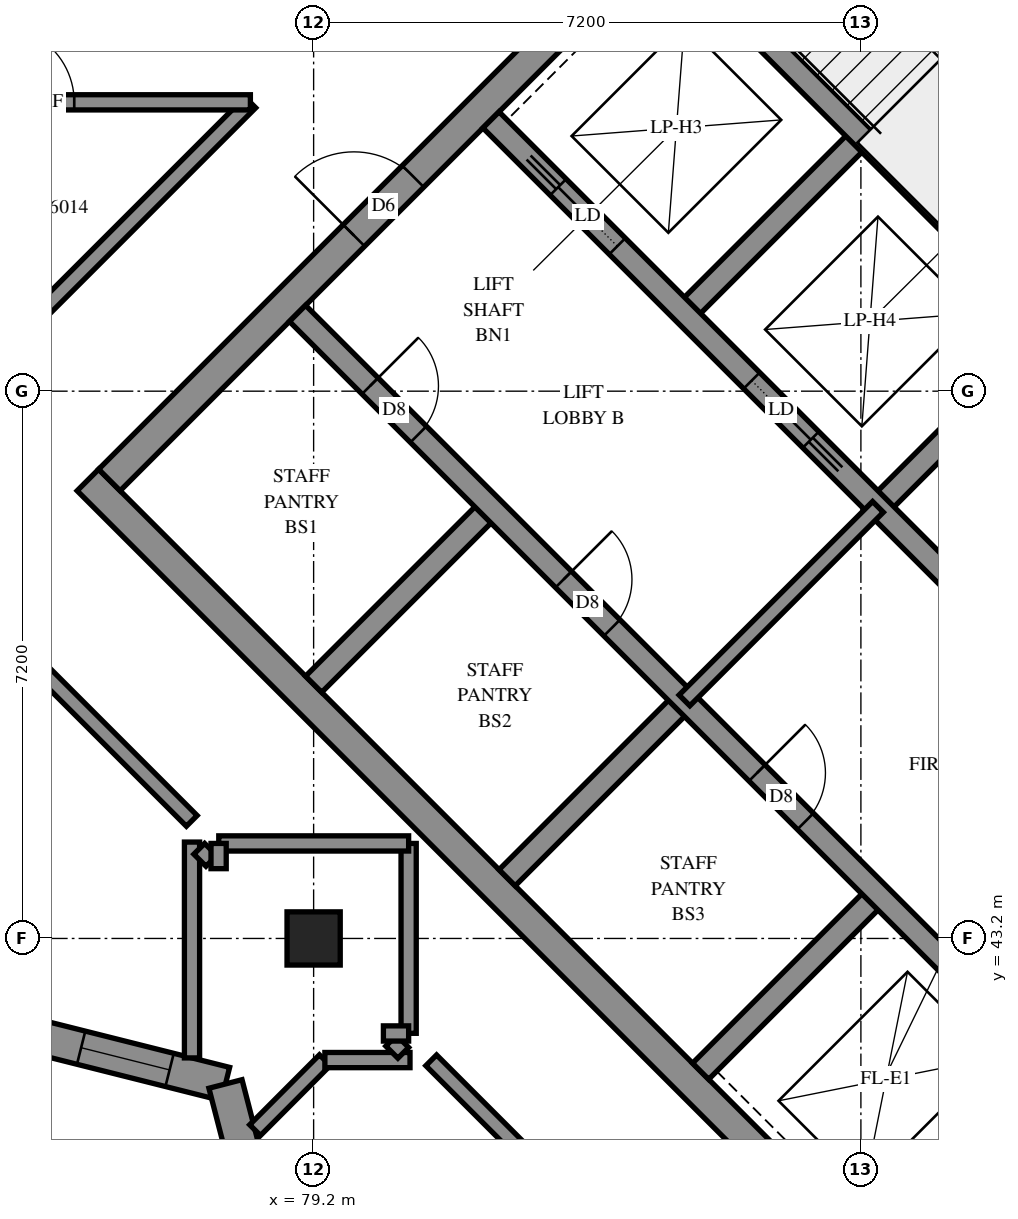
"""IFC4 building model, lengths in metres.
Left out: names, types, materials, properties, quantities, classifications, styles, units other than length and angle.
Written with IfcOpenShell. Run it as: python <this file> out.ifc"""

import sys

from ifc_helpers import new_model, si_unit, direction, frame, frame_2d, origin, origin_2d, place, context, subcontext, project, spatial, polyline, rectangle, outline, extrude, element, fill, save


model = new_model("IFC4")
c1 = context("Model", 3, precision=1e-05, world=origin(), true_north=direction((0.0, 1.0)))
c2 = subcontext(c1, "Body", "Model", "MODEL_VIEW")
j1 = project(units=[si_unit("LENGTHUNIT", "METRE"), si_unit("PLANEANGLEUNIT", "RADIAN")], contexts=[c1])
p1 = place(None, origin())
s1 = spatial("IfcSite", under=j1, at=p1, CompositionType="ELEMENT")
p2 = place(p1, origin())
s2 = spatial("IfcBuilding", under=s1, at=p2, CompositionType="ELEMENT")
p3 = place(p2, frame((0.0, 0.0, 243.8)))
s3 = spatial("IfcBuildingStorey", under=s2, at=p3, CompositionType="ELEMENT", Elevation=243.8)
p4 = place(p3, frame((79.2, 43.2, 0.0), z_axis=(0.0, 0.0, 1.0), x_axis=(1.0, 0.0, 0.0)))
e1 = element("IfcColumn", 1, at=p4, inside=s3, PredefinedType="COLUMN", context=c2, shape_type="SweptSolid", body=[
    extrude(rectangle(XDim=0.7, YDim=0.7, at=origin_2d()), origin(), (0.0, 0.0, 1.0), 3.1),
])
p5 = place(p3, frame((76.23, 49.231, -0.3), z_axis=(0.0, 0.0, 1.0), x_axis=(0.7071034917, -0.7071100706, 0.0)))
e2 = element("IfcWall", 2, at=p5, inside=s3, PredefinedType="SHEAR", context=c2, shape_type="SweptSolid", body=[
    extrude(rectangle(XDim=15.2, YDim=0.4, at=frame_2d((7.6, 0.0))), origin(), (0.0, 0.0, 1.0), 2.7),
])
p6 = place(p3, frame((86.695, 59.696, -0.3), z_axis=(0.0, 0.0, 1.0), x_axis=(0.7071100706, -0.7071034917, 0.0)))
e3 = element("IfcWall", 3, at=p6, inside=s3, PredefinedType="SHEAR", context=c2, shape_type="SweptSolid", body=[
    extrude(rectangle(XDim=15.2, YDim=0.4, at=frame_2d((7.6, 0.0))), origin(), (0.0, 0.0, 1.0), 2.7),
])
p7 = place(p6, frame((10.4, 0.0, 0.3)))
e4 = element("IfcOpeningElement", 4, at=p7, cuts=e3, PredefinedType="OPENING", context=c2, shape_type="SweptSolid", body=[
    extrude(rectangle(XDim=0.8, YDim=2.1, at=frame_2d((0.4, 1.05))), frame((0.0, 0.21, 0.0), z_axis=(0.0, -1.0, 0.0), x_axis=(1.0, 0.0, 0.0)), (0.0, 0.0, 1.0), 0.42),
])
p8 = place(p3, frame((76.513, 49.231, -0.3), z_axis=(0.0, 0.0, 1.0), x_axis=(0.7071067812, 0.7071067812, 0.0)))
e5 = element("IfcWall", 5, at=p8, inside=s3, PredefinedType="SHEAR", context=c2, shape_type="SweptSolid", body=[
    extrude(rectangle(XDim=14.4, YDim=0.4, at=frame_2d((7.2, 0.0))), origin(), (0.0, 0.0, 1.0), 2.7),
])
p9 = place(p8, frame((4.55, 0.0, 0.3)))
e6 = element("IfcOpeningElement", 6, at=p9, cuts=e5, PredefinedType="OPENING", context=c2, shape_type="SweptSolid", body=[
    extrude(rectangle(XDim=1.1, YDim=2.1, at=frame_2d((0.55, 1.05))), frame((0.0, 0.21, 0.0), z_axis=(0.0, -1.0, 0.0), x_axis=(1.0, 0.0, 0.0)), (0.0, 0.0, 1.0), 0.42),
])
p10 = place(p8, frame((11.35, 0.0, 0.3)))
e7 = element("IfcOpeningElement", 7, at=p10, cuts=e5, PredefinedType="OPENING", context=c2, shape_type="SweptSolid", body=[
    extrude(rectangle(XDim=1.1, YDim=2.1, at=frame_2d((0.55, 1.05))), frame((0.0, 0.21, 0.0), z_axis=(0.0, -1.0, 0.0), x_axis=(1.0, 0.0, 0.0)), (0.0, 0.0, 1.0), 0.42),
])
p11 = place(p3, frame((86.978, 38.766, -0.3), z_axis=(0.0, 0.0, 1.0), x_axis=(0.7071067812, 0.7071067812, 0.0)))
e8 = element("IfcWall", 8, at=p11, inside=s3, PredefinedType="SHEAR", context=c2, shape_type="SweptSolid", body=[
    extrude(rectangle(XDim=14.4, YDim=0.4, at=frame_2d((7.2, 0.0))), origin(), (0.0, 0.0, 1.0), 2.7),
])
p12 = place(p11, frame((4.55, 0.0, 0.3)))
e9 = element("IfcOpeningElement", 9, at=p12, cuts=e8, PredefinedType="OPENING", context=c2, shape_type="SweptSolid", body=[
    extrude(rectangle(XDim=1.1, YDim=2.1, at=frame_2d((0.55, 1.05))), frame((0.0, 0.21, 0.0), z_axis=(0.0, -1.0, 0.0), x_axis=(1.0, 0.0, 0.0)), (0.0, 0.0, 1.0), 0.42),
])
p13 = place(p11, frame((11.35, 0.0, 0.3)))
e10 = element("IfcOpeningElement", 10, at=p13, cuts=e8, PredefinedType="OPENING", context=c2, shape_type="SweptSolid", body=[
    extrude(rectangle(XDim=1.1, YDim=2.1, at=frame_2d((0.55, 1.05))), frame((0.0, 0.21, 0.0), z_axis=(0.0, -1.0, 0.0), x_axis=(1.0, 0.0, 0.0)), (0.0, 0.0, 1.0), 0.42),
])
for number, where, z_axis, x_axis in (
    (11, (79.2, 46.544, 0.0), (0.0, 0.0, 1.0), (0.707, 0.707, 0.0)),
    (12, (84.079, 51.423, 0.0), (0.0, 0.0, 1.0), (0.707, 0.707, 0.0)),
):
    element("IfcWall", number, at=place(p3, frame(where, z_axis=z_axis, x_axis=x_axis)), inside=s3, PredefinedType="SOLIDWALL", context=c2, shape_type="SweptSolid", body=[
        extrude(rectangle(XDim=3.3, YDim=0.3, at=frame_2d((1.65, 0.0))), origin(), (0.0, 0.0, 1.0), 3.1),
    ])
p14 = place(p3, frame((81.746, 43.999, 0.0), z_axis=(0.0, 0.0, 1.0), x_axis=(0.7071067812, 0.7071067812, 0.0)))
e13 = element("IfcWall", 13, at=p14, inside=s3, PredefinedType="SOLIDWALL", context=c2, shape_type="SweptSolid", body=[
    extrude(rectangle(XDim=3.3, YDim=0.3, at=frame_2d((1.65, 0.0))), origin(), (0.0, 0.0, 1.0), 3.1),
])
p15 = place(p3, frame((86.625, 48.878, 0.0), z_axis=(0.0, 0.0, 1.0), x_axis=(0.7071067812, 0.7071067812, 0.0)))
e14 = element("IfcWall", 14, at=p15, inside=s3, PredefinedType="SOLIDWALL", context=c2, shape_type="SweptSolid", body=[
    extrude(rectangle(XDim=3.3, YDim=0.3, at=frame_2d((1.65, 0.0))), origin(), (0.0, 0.0, 1.0), 3.1),
])
p16 = place(p3, frame((84.291, 41.453, 0.0), z_axis=(0.0, 0.0, 1.0), x_axis=(0.7071067812, 0.7071067812, 0.0)))
e15 = element("IfcWall", 15, at=p16, inside=s3, PredefinedType="SOLIDWALL", context=c2, shape_type="SweptSolid", body=[
    extrude(rectangle(XDim=3.3, YDim=0.3, at=frame_2d((1.65, 0.0))), origin(), (0.0, 0.0, 1.0), 3.1),
])
p17 = place(p3, frame((78.988, 51.423, 0.0), z_axis=(0.0, 0.0, 1.0), x_axis=(0.7071067812, -0.7071067812, 0.0)))
e16 = element("IfcWall", 16, at=p17, inside=s3, PredefinedType="SOLIDWALL", context=c2, shape_type="SweptSolid", body=[
    extrude(rectangle(XDim=14.4, YDim=0.3, at=frame_2d((7.2, 0.0))), origin(), (0.0, 0.0, 1.0), 3.1),
])
p18 = place(p17, frame((1.35, 0.0, 0.0)))
e17 = element("IfcOpeningElement", 17, at=p18, cuts=e16, PredefinedType="OPENING", context=c2, shape_type="SweptSolid", body=[
    extrude(rectangle(XDim=0.9, YDim=2.1, at=frame_2d((0.45, 1.05))), frame((0.0, 0.16, 0.0), z_axis=(0.0, -1.0, 0.0), x_axis=(1.0, 0.0, 0.0)), (0.0, 0.0, 1.0), 0.32),
])
p19 = place(p17, frame((4.95, 0.0, 0.0)))
e18 = element("IfcOpeningElement", 18, at=p19, cuts=e16, PredefinedType="OPENING", context=c2, shape_type="SweptSolid", body=[
    extrude(rectangle(XDim=0.9, YDim=2.1, at=frame_2d((0.45, 1.05))), frame((0.0, 0.16, 0.0), z_axis=(0.0, -1.0, 0.0), x_axis=(1.0, 0.0, 0.0)), (0.0, 0.0, 1.0), 0.32),
])
p20 = place(p17, frame((8.55, 0.0, 0.0)))
e19 = element("IfcOpeningElement", 19, at=p20, cuts=e16, PredefinedType="OPENING", context=c2, shape_type="SweptSolid", body=[
    extrude(rectangle(XDim=0.9, YDim=2.1, at=frame_2d((0.45, 1.05))), frame((0.0, 0.16, 0.0), z_axis=(0.0, -1.0, 0.0), x_axis=(1.0, 0.0, 0.0)), (0.0, 0.0, 1.0), 0.32),
])
p21 = place(p17, frame((12.05, 0.0, 0.0)))
e20 = element("IfcOpeningElement", 20, at=p21, cuts=e16, PredefinedType="OPENING", context=c2, shape_type="SweptSolid", body=[
    extrude(rectangle(XDim=1.1, YDim=2.1, at=frame_2d((0.55, 1.05))), frame((0.0, 0.16, 0.0), z_axis=(0.0, -1.0, 0.0), x_axis=(1.0, 0.0, 0.0)), (0.0, 0.0, 1.0), 0.32),
])
p22 = place(p3, frame((81.534, 53.969, 0.0), z_axis=(0.0, 0.0, 1.0), x_axis=(0.707103309, -0.7071102534, 0.0)))
e21 = element("IfcWall", 21, at=p22, inside=s3, PredefinedType="SOLIDWALL", context=c2, shape_type="SweptSolid", body=[
    extrude(rectangle(XDim=14.4, YDim=0.3, at=frame_2d((7.2, 0.0))), origin(), (0.0, 0.0, 1.0), 3.1),
])
p23 = place(p22, frame((8.55, 0.0, 0.0)))
e22 = element("IfcOpeningElement", 22, at=p23, cuts=e21, PredefinedType="OPENING", context=c2, shape_type="SweptSolid", body=[
    extrude(rectangle(XDim=0.9, YDim=2.1, at=frame_2d((0.45, 1.05))), frame((0.0, 0.16, 0.0), z_axis=(0.0, -1.0, 0.0), x_axis=(1.0, 0.0, 0.0)), (0.0, 0.0, 1.0), 0.32),
])
p24 = place(p22, frame((1.25, 0.0, 0.0)))
e23 = element("IfcOpeningElement", 23, at=p24, cuts=e21, PredefinedType="OPENING", context=c2, shape_type="SweptSolid", body=[
    extrude(rectangle(XDim=1.1, YDim=2.1, at=frame_2d((0.55, 1.05))), frame((0.0, 0.16, 0.0), z_axis=(0.0, -1.0, 0.0), x_axis=(1.0, 0.0, 0.0)), (0.0, 0.0, 1.0), 0.32),
])
p25 = place(p22, frame((4.85, 0.0, 0.0)))
e24 = element("IfcOpeningElement", 24, at=p25, cuts=e21, PredefinedType="OPENING", context=c2, shape_type="SweptSolid", body=[
    extrude(rectangle(XDim=1.1, YDim=2.1, at=frame_2d((0.55, 1.05))), frame((0.0, 0.16, 0.0), z_axis=(0.0, -1.0, 0.0), x_axis=(1.0, 0.0, 0.0)), (0.0, 0.0, 1.0), 0.32),
])
p26 = place(p22, frame((12.05, 0.0, 0.0)))
e25 = element("IfcOpeningElement", 25, at=p26, cuts=e21, PredefinedType="OPENING", context=c2, shape_type="SweptSolid", body=[
    extrude(rectangle(XDim=1.1, YDim=2.1, at=frame_2d((0.55, 1.05))), frame((0.0, 0.16, 0.0), z_axis=(0.0, -1.0, 0.0), x_axis=(1.0, 0.0, 0.0)), (0.0, 0.0, 1.0), 0.32),
])
p27 = place(p3, frame((83.867, 56.302, 0.0), z_axis=(0.0, 0.0, 1.0), x_axis=(0.7071137256, -0.7070998367, 0.0)))
e26 = element("IfcWall", 26, at=p27, inside=s3, PredefinedType="SOLIDWALL", context=c2, shape_type="SweptSolid", body=[
    extrude(rectangle(XDim=7.2, YDim=0.3, at=frame_2d((3.6, 0.0))), origin(), (0.0, 0.0, 1.0), 3.1),
])
p28 = place(p3, frame((74.292, 42.227, 0.0), z_axis=(0.0, 0.0, 1.0), x_axis=(0.9698602389, -0.2436618909, 0.0)))
e27 = element("IfcWall", 27, at=p28, inside=s3, PredefinedType="SOLIDWALL", context=c2, shape_type="SweptSolid", body=[
    extrude(outline(polyline([(0.037, -0.225), (3.731, -0.225), (3.998, 0.225), (-0.037, 0.225), (0.037, -0.225)])), origin(), (0.0, 0.0, 1.0), 3.1),
])
p29 = place(p28, frame((1.906, 0.0, 0.45)))
e28 = element("IfcOpeningElement", 28, at=p29, cuts=e27, PredefinedType="OPENING", context=c2, shape_type="SweptSolid", body=[
    extrude(rectangle(XDim=1.2, YDim=2.55, at=frame_2d((0.6, 1.275))), frame((0.0, 0.235, 0.0), z_axis=(0.0, -1.0, 0.0), x_axis=(1.0, 0.0, 0.0)), (0.0, 0.0, 1.0), 0.47),
])
p30 = place(p3, frame((78.04, 41.286, 0.0), z_axis=(0.0, 0.0, 1.0), x_axis=(0.2504616436, -0.9681265233, 0.0)))
e29 = element("IfcWall", 29, at=p30, inside=s3, PredefinedType="SOLIDWALL", context=c2, shape_type="SweptSolid", body=[
    extrude(outline(polyline([(0.134, -0.225), (4.863, -0.225), (4.609, 0.225), (-0.134, 0.225), (0.134, -0.225)])), origin(), (0.0, 0.0, 1.0), 3.1),
])
p31 = place(p30, frame((0.821, 0.0, 0.45)))
e30 = element("IfcOpeningElement", 30, at=p31, cuts=e29, PredefinedType="OPENING", context=c2, shape_type="SweptSolid", body=[
    extrude(rectangle(XDim=1.2, YDim=2.55, at=frame_2d((0.6, 1.275))), frame((0.0, 0.235, 0.0), z_axis=(0.0, -1.0, 0.0), x_axis=(1.0, 0.0, 0.0)), (0.0, 0.0, 1.0), 0.47),
])
p32 = place(p30, frame((2.475, 0.0, 0.45)))
e31 = element("IfcOpeningElement", 31, at=p32, cuts=e29, PredefinedType="OPENING", context=c2, shape_type="SweptSolid", body=[
    extrude(rectangle(XDim=1.2, YDim=2.55, at=frame_2d((0.6, 1.275))), frame((0.0, 0.235, 0.0), z_axis=(0.0, -1.0, 0.0), x_axis=(1.0, 0.0, 0.0)), (0.0, 0.0, 1.0), 0.47),
])
p33 = place(p3, frame((84.079, 46.332, 0.0), z_axis=(0.0, 0.0, 1.0), x_axis=(0.7071067812, 0.7071067812, 0.0)))
e32 = element("IfcWall", 32, at=p33, inside=s3, PredefinedType="PARTITIONING", context=c2, shape_type="SweptSolid", body=[
    extrude(rectangle(XDim=3.6, YDim=0.2, at=frame_2d((1.8, 0.0))), origin(), (0.0, 0.0, 1.0), 3.1),
])
p34 = place(p3, frame((80.747, 41.597, 0.0), z_axis=(0.0, 0.0, 1.0), x_axis=(0.7071067812, -0.7071067812, 0.0)))
e33 = element("IfcWall", 33, at=p34, inside=s3, PredefinedType="PARTITIONING", context=c2, shape_type="SweptSolid", body=[
    extrude(rectangle(XDim=8.607, YDim=0.2, at=frame_2d((4.303, 0.0))), origin(), (0.0, 0.0, 1.0), 3.1),
])
p35 = place(p34, frame((2.903, 0.0, 0.0)))
e34 = element("IfcOpeningElement", 34, at=p35, cuts=e33, PredefinedType="OPENING", context=c2, shape_type="SweptSolid", body=[
    extrude(rectangle(XDim=1.0, YDim=2.1, at=frame_2d((0.5, 1.05))), frame((0.0, 0.11, 0.0), z_axis=(0.0, -1.0, 0.0), x_axis=(1.0, 0.0, 0.0)), (0.0, 0.0, 1.0), 0.22),
])
p36 = place(p3, frame((86.836, 35.514, 0.0), z_axis=(0.0, 0.0, 1.0), x_axis=(0.7071067812, 0.7071067812, 0.0)))
e35 = element("IfcWall", 35, at=p36, inside=s3, PredefinedType="PARTITIONING", context=c2, shape_type="SweptSolid", body=[
    extrude(rectangle(XDim=7.399, YDim=0.2, at=frame_2d((3.7, 0.0))), origin(), (0.0, 0.0, 1.0), 3.1),
])
p37 = place(p36, frame((6.142, 0.0, 0.0)))
e36 = element("IfcOpeningElement", 36, at=p37, cuts=e35, PredefinedType="OPENING", context=c2, shape_type="SweptSolid", body=[
    extrude(rectangle(XDim=1.0, YDim=2.1, at=frame_2d((0.5, 1.05))), frame((0.0, 0.11, 0.0), z_axis=(0.0, -1.0, 0.0), x_axis=(1.0, 0.0, 0.0)), (0.0, 0.0, 1.0), 0.22),
])
p38 = place(p3, frame((74.401, 50.233, 0.0), z_axis=(0.0, 0.0, 1.0), x_axis=(0.7071067812, 0.7071067812, 0.0)))
e37 = element("IfcWall", 37, at=p38, inside=s3, PredefinedType="PARTITIONING", context=c2, shape_type="SweptSolid", body=[
    extrude(rectangle(XDim=5.609, YDim=0.2, at=frame_2d((2.804, 0.0))), origin(), (0.0, 0.0, 1.0), 3.1),
])
p39 = place(p3, frame((74.347, 47.997, 0.0), z_axis=(0.0, 0.0, 1.0), x_axis=(0.7071067812, -0.7071067812, 0.0)))
e38 = element("IfcWall", 38, at=p39, inside=s3, PredefinedType="PARTITIONING", context=c2, shape_type="SweptSolid", body=[
    extrude(rectangle(XDim=4.596, YDim=0.2, at=frame_2d((2.298, 0.0))), origin(), (0.0, 0.0, 1.0), 3.1),
])
p40 = place(p39, frame((0.401, 0.0, 0.0)))
e39 = element("IfcOpeningElement", 39, at=p40, cuts=e38, PredefinedType="OPENING", context=c2, shape_type="SweptSolid", body=[
    extrude(rectangle(XDim=1.0, YDim=2.1, at=frame_2d((0.5, 1.05))), frame((0.0, 0.11, 0.0), z_axis=(0.0, -1.0, 0.0), x_axis=(1.0, 0.0, 0.0)), (0.0, 0.0, 1.0), 0.22),
])
p41 = place(p3, frame((74.402, 54.2, 0.0), z_axis=(0.0, 0.0, 1.0), x_axis=(1.0, 0.0, 0.0)))
e40 = element("IfcWall", 40, at=p41, inside=s3, PredefinedType="PARTITIONING", context=c2, shape_type="SweptSolid", body=[
    extrude(rectangle(XDim=3.966, YDim=0.2, at=frame_2d((1.983, 0.0))), origin(), (0.0, 0.0, 1.0), 3.1),
])
p42 = place(p41, frame((0.649, 0.0, 0.0)))
e41 = element("IfcOpeningElement", 41, at=p42, cuts=e40, PredefinedType="OPENING", context=c2, shape_type="SweptSolid", body=[
    extrude(rectangle(XDim=1.0, YDim=2.1, at=frame_2d((0.5, 1.05))), frame((0.0, 0.11, 0.0), z_axis=(0.0, -1.0, 0.0), x_axis=(1.0, 0.0, 0.0)), (0.0, 0.0, 1.0), 0.22),
])
p43 = place(p3, frame((77.6, 41.628, 0.0), z_axis=(0.0, 0.0, 1.0), x_axis=(0.0, 1.0, 0.0)))
e42 = element("IfcWall", 42, at=p43, inside=s3, PredefinedType="PARTITIONING", context=c2, shape_type="SweptSolid", body=[
    extrude(rectangle(XDim=2.84, YDim=0.2, at=frame_2d((1.42, 0.0))), origin(), (0.0, 0.0, 1.0), 3.1),
])
for number, where, z_axis, x_axis in (
    (43, (80.45, 41.952, 0.0), (0.0, 0.0, 1.0), (0.0, 1.0, 0.0)),
    (44, (77.952, 44.45, 0.0), (0.0, 0.0, 1.0), (1.0, 0.0, 0.0)),
):
    element("IfcWall", number, at=place(p3, frame(where, z_axis=z_axis, x_axis=x_axis)), inside=s3, PredefinedType="PARTITIONING", context=c2, shape_type="SweptSolid", body=[
        extrude(rectangle(XDim=2.498, YDim=0.2, at=frame_2d((1.249, 0.0))), origin(), (0.0, 0.0, 1.0), 3.1),
    ])
p44 = place(p3, frame((78.43, 40.678, 0.0), z_axis=(0.0, 0.0, 1.0), x_axis=(0.7059516948, 0.7082599837, 0.0)))
e45 = element("IfcWall", 45, at=p44, inside=s3, PredefinedType="PARTITIONING", context=c2, shape_type="SweptSolid", body=[
    extrude(rectangle(XDim=1.3, YDim=0.2, at=frame_2d((0.65, 0.0))), origin(), (0.0, 0.0, 1.0), 3.1),
])
p45 = place(p3, frame((79.348, 41.6, 0.0), z_axis=(0.0, 0.0, 1.0), x_axis=(1.0, 0.0, 0.0)))
e46 = element("IfcWall", 46, at=p45, inside=s3, PredefinedType="PARTITIONING", context=c2, shape_type="SweptSolid", body=[
    extrude(rectangle(XDim=1.12, YDim=0.2, at=frame_2d((0.56, 0.0))), origin(), (0.0, 0.0, 1.0), 3.1),
])
for number, where, z_axis, x_axis in (
    (47, (80.221, 41.855, 0.0), (0.0, 0.0, 1.0), (0.707, -0.707, 0.0)),
    (48, (77.695, 44.38, 0.0), (0.0, 0.0, 1.0), (0.707, -0.707, 0.0)),
):
    element("IfcWall", number, at=place(p3, frame(where, z_axis=z_axis, x_axis=x_axis)), inside=s3, PredefinedType="PARTITIONING", context=c2, shape_type="SweptSolid", body=[
        extrude(rectangle(XDim=0.225, YDim=0.2, at=frame_2d((0.112, 0.0))), origin(), (0.0, 0.0, 1.0), 3.1),
    ])
for number, where, z_axis, x_axis in (
    (49, (80.118, 41.95, 0.0), (0.0, 0.0, 1.0), (1.0, 0.0, 0.0)),
    (50, (77.95, 44.118, 0.0), (0.0, 0.0, 1.0), (0.0, 1.0, 0.0)),
):
    element("IfcWall", number, at=place(p3, frame(where, z_axis=z_axis, x_axis=x_axis)), inside=s3, PredefinedType="PARTITIONING", context=c2, shape_type="SweptSolid", body=[
        extrude(rectangle(XDim=0.332, YDim=0.2, at=frame_2d((0.166, 0.0))), origin(), (0.0, 0.0, 1.0), 3.1),
    ])
p46 = place(p29, origin())
e51 = element("IfcWindow", 51, at=p46, inside=s3, PartitioningType="SINGLE_PANEL", PredefinedType="WINDOW", context=c2, shape_type="SweptSolid", body=[
    extrude(rectangle(XDim=1.2, YDim=2.55, at=frame_2d((0.6, 1.275))), frame((0.0, 0.205, 0.0), z_axis=(0.0, -1.0, 0.0), x_axis=(1.0, 0.0, 0.0)), (0.0, 0.0, 1.0), 0.06),
])
fill(e28, e51)
p47 = place(p9, origin())
e52 = element("IfcDoor", 52, at=p47, inside=s3, OperationType="DOUBLE_DOOR_SINGLE_SWING", PredefinedType="DOOR", context=c2, shape_type="SweptSolid", body=[
    extrude(rectangle(XDim=1.1, YDim=2.1, at=frame_2d((0.55, 1.05))), frame((0.0, 0.025, 0.0), z_axis=(0.0, -1.0, 0.0), x_axis=(1.0, 0.0, 0.0)), (0.0, 0.0, 1.0), 0.05),
])
fill(e6, e52)
p48 = place(p18, origin())
e53 = element("IfcDoor", 53, at=p48, inside=s3, OperationType="SINGLE_SWING_LEFT", PredefinedType="DOOR", context=c2, shape_type="SweptSolid", body=[
    extrude(rectangle(XDim=0.9, YDim=2.1, at=frame_2d((0.45, 1.05))), frame((0.0, 0.025, 0.0), z_axis=(0.0, -1.0, 0.0), x_axis=(1.0, 0.0, 0.0)), (0.0, 0.0, 1.0), 0.05),
])
fill(e17, e53)
p49 = place(p19, origin())
e54 = element("IfcDoor", 54, at=p49, inside=s3, OperationType="SINGLE_SWING_LEFT", PredefinedType="DOOR", context=c2, shape_type="SweptSolid", body=[
    extrude(rectangle(XDim=0.9, YDim=2.1, at=frame_2d((0.45, 1.05))), frame((0.0, 0.025, 0.0), z_axis=(0.0, -1.0, 0.0), x_axis=(1.0, 0.0, 0.0)), (0.0, 0.0, 1.0), 0.05),
])
fill(e18, e54)
p50 = place(p20, origin())
e55 = element("IfcDoor", 55, at=p50, inside=s3, OperationType="SINGLE_SWING_LEFT", PredefinedType="DOOR", context=c2, shape_type="SweptSolid", body=[
    extrude(rectangle(XDim=0.9, YDim=2.1, at=frame_2d((0.45, 1.05))), frame((0.0, 0.025, 0.0), z_axis=(0.0, -1.0, 0.0), x_axis=(1.0, 0.0, 0.0)), (0.0, 0.0, 1.0), 0.05),
])
fill(e19, e55)
p51 = place(p24, origin())
e56 = element("IfcDoor", 56, at=p51, inside=s3, OperationType="SLIDING_TO_LEFT", PredefinedType="DOOR", context=c2, shape_type="SweptSolid", body=[
    extrude(rectangle(XDim=1.1, YDim=2.1, at=frame_2d((0.55, 1.05))), frame((0.0, 0.025, 0.0), z_axis=(0.0, -1.0, 0.0), x_axis=(1.0, 0.0, 0.0)), (0.0, 0.0, 1.0), 0.05),
])
fill(e23, e56)
p52 = place(p25, origin())
e57 = element("IfcDoor", 57, at=p52, inside=s3, OperationType="SLIDING_TO_RIGHT", PredefinedType="DOOR", context=c2, shape_type="SweptSolid", body=[
    extrude(rectangle(XDim=1.1, YDim=2.1, at=frame_2d((0.55, 1.05))), frame((0.0, 0.025, 0.0), z_axis=(0.0, -1.0, 0.0), x_axis=(1.0, 0.0, 0.0)), (0.0, 0.0, 1.0), 0.05),
])
fill(e24, e57)
p53 = place(p42, origin())
e58 = element("IfcDoor", 58, at=p53, inside=s3, OperationType="SINGLE_SWING_RIGHT", PredefinedType="DOOR", context=c2, shape_type="SweptSolid", body=[
    extrude(rectangle(XDim=1.0, YDim=2.1, at=frame_2d((0.5, 1.05))), frame((0.0, 0.025, 0.0), z_axis=(0.0, -1.0, 0.0), x_axis=(1.0, 0.0, 0.0)), (0.0, 0.0, 1.0), 0.05),
])
fill(e41, e58)
save(model, sys.argv[1])
